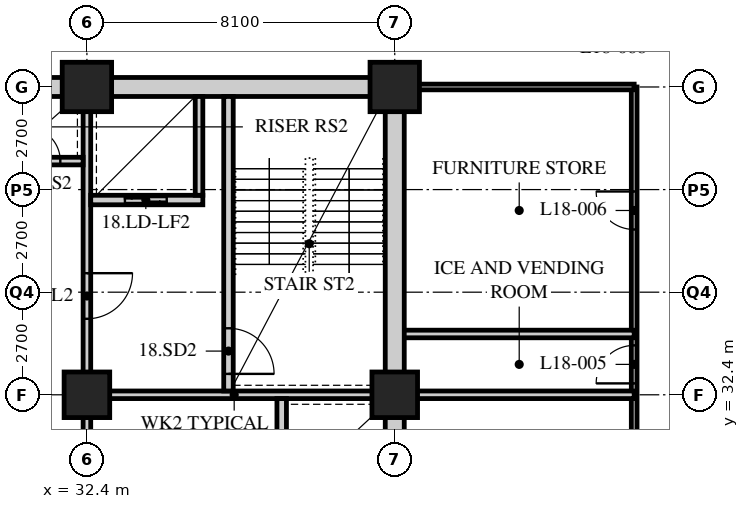
"""IFC4 building model, lengths in metres.
Left out: names, types, materials, properties, quantities, classifications, styles, units other than length and angle.
Written with IfcOpenShell. Run it as: python <this file> out.ifc"""

import sys

from ifc_helpers import new_model, si_unit, direction, frame, frame_2d, origin, origin_2d, place, context, subcontext, project, spatial, rectangle, hollow_rectangle, extrude, element, fill, save


model = new_model("IFC4")
c1 = context("Model", 3, precision=1e-05, world=origin(), true_north=direction((0.0, 1.0)))
c2 = subcontext(c1, "Body", "Model", "MODEL_VIEW")
j1 = project(units=[si_unit("LENGTHUNIT", "METRE"), si_unit("PLANEANGLEUNIT", "RADIAN")], contexts=[c1])
p1 = place(None, origin())
s1 = spatial("IfcSite", under=j1, at=p1, CompositionType="ELEMENT")
p2 = place(p1, origin())
s2 = spatial("IfcBuilding", under=s1, at=p2, CompositionType="ELEMENT")
p3 = place(p2, frame((0.0, 0.0, 73.8)))
s3 = spatial("IfcBuildingStorey", under=s2, at=p3, CompositionType="ELEMENT", Elevation=73.8)
p4 = place(p3, frame((32.4, 32.4, 0.0), z_axis=(0.0, 0.0, 1.0), x_axis=(1.0, 0.0, 0.0)))
e1 = element("IfcColumn", 1, at=p4, inside=s3, PredefinedType="COLUMN", context=c2, shape_type="SweptSolid", body=[
    extrude(hollow_rectangle(XDim=1.2, YDim=1.2, WallThickness=0.12, at=origin_2d()), origin(), (0.0, 0.0, 1.0), 3.4),
])
p5 = place(p3, frame((32.4, 40.5, 0.0), z_axis=(0.0, 0.0, 1.0), x_axis=(1.0, 0.0, 0.0)))
e2 = element("IfcColumn", 2, at=p5, inside=s3, PredefinedType="COLUMN", context=c2, shape_type="SweptSolid", body=[
    extrude(hollow_rectangle(XDim=1.3, YDim=1.3, WallThickness=0.13, at=origin_2d()), origin(), (0.0, 0.0, 1.0), 3.4),
])
p6 = place(p3, frame((40.5, 32.4, 0.0), z_axis=(0.0, 0.0, 1.0), x_axis=(1.0, 0.0, 0.0)))
e3 = element("IfcColumn", 3, at=p6, inside=s3, PredefinedType="COLUMN", context=c2, shape_type="SweptSolid", body=[
    extrude(hollow_rectangle(XDim=1.2, YDim=1.2, WallThickness=0.12, at=origin_2d()), origin(), (0.0, 0.0, 1.0), 3.4),
])
p7 = place(p3, frame((40.5, 40.5, 0.0), z_axis=(0.0, 0.0, 1.0), x_axis=(1.0, 0.0, 0.0)))
e4 = element("IfcColumn", 4, at=p7, inside=s3, PredefinedType="COLUMN", context=c2, shape_type="SweptSolid", body=[
    extrude(hollow_rectangle(XDim=1.3, YDim=1.3, WallThickness=0.13, at=origin_2d()), origin(), (0.0, 0.0, 1.0), 3.4),
])
p8 = place(p3, frame((46.8, 18.0, 0.0), z_axis=(0.0, 0.0, 1.0), x_axis=(0.0, 1.0, 0.0)))
e5 = element("IfcWall", 5, at=p8, inside=s3, PredefinedType="PARTITIONING", context=c2, shape_type="SweptSolid", body=[
    extrude(rectangle(XDim=22.5, YDim=0.15, at=frame_2d((11.25, 0.0))), origin(), (0.0, 0.0, 1.0), 3.19),
])
p9 = place(p8, frame((7.229, 0.0, 0.0)))
e6 = element("IfcOpeningElement", 6, at=p9, cuts=e5, PredefinedType="OPENING", context=c2, shape_type="SweptSolid", body=[
    extrude(rectangle(XDim=1.0, YDim=2.1, at=frame_2d((0.5, 1.05))), frame((0.0, 0.085, 0.0), z_axis=(0.0, -1.0, 0.0), x_axis=(1.0, 0.0, 0.0)), (0.0, 0.0, 1.0), 0.17),
])
p10 = place(p8, frame((11.279, 0.0, 0.0)))
e7 = element("IfcOpeningElement", 7, at=p10, cuts=e5, PredefinedType="OPENING", context=c2, shape_type="SweptSolid", body=[
    extrude(rectangle(XDim=1.0, YDim=2.1, at=frame_2d((0.5, 1.05))), frame((0.0, 0.085, 0.0), z_axis=(0.0, -1.0, 0.0), x_axis=(1.0, 0.0, 0.0)), (0.0, 0.0, 1.0), 0.17),
])
p11 = place(p8, frame((14.7, 0.0, 0.0)))
e8 = element("IfcOpeningElement", 8, at=p11, cuts=e5, PredefinedType="OPENING", context=c2, shape_type="SweptSolid", body=[
    extrude(rectangle(XDim=1.0, YDim=2.1, at=frame_2d((0.5, 1.05))), frame((0.0, 0.085, 0.0), z_axis=(0.0, -1.0, 0.0), x_axis=(1.0, 0.0, 0.0)), (0.0, 0.0, 1.0), 0.17),
])
p12 = place(p8, frame((18.75, 0.0, 0.0)))
e9 = element("IfcOpeningElement", 9, at=p12, cuts=e5, PredefinedType="OPENING", context=c2, shape_type="SweptSolid", body=[
    extrude(rectangle(XDim=1.0, YDim=2.1, at=frame_2d((0.5, 1.05))), frame((0.0, 0.085, 0.0), z_axis=(0.0, -1.0, 0.0), x_axis=(1.0, 0.0, 0.0)), (0.0, 0.0, 1.0), 0.17),
])
p13 = place(p3, frame((46.8, 40.5, 0.0), z_axis=(0.0, 0.0, 1.0), x_axis=(-1.0, 0.0, 0.0)))
e10 = element("IfcWall", 10, at=p13, inside=s3, PredefinedType="PARTITIONING", context=c2, shape_type="SweptSolid", body=[
    extrude(rectangle(XDim=6.1, YDim=0.15, at=frame_2d((3.05, 0.0))), origin(), (0.0, 0.0, 1.0), 2.578),
])
p14 = place(p3, frame((40.5, 32.4, 0.0), z_axis=(0.0, 0.0, 1.0), x_axis=(1.0, 0.0, 0.0)))
e11 = element("IfcWall", 11, at=p14, inside=s3, PredefinedType="SOLIDWALL", context=c2, shape_type="SweptSolid", body=[
    extrude(rectangle(XDim=6.3, YDim=0.2, at=frame_2d((3.15, 0.0))), origin(), (0.0, 0.0, 1.0), 2.578),
])
p15 = place(p3, frame((46.8, 34.0, 0.0), z_axis=(0.0, 0.0, 1.0), x_axis=(-1.0, 0.0, 0.0)))
e12 = element("IfcWall", 12, at=p15, inside=s3, PredefinedType="SOLIDWALL", context=c2, shape_type="SweptSolid", body=[
    extrude(rectangle(XDim=6.3, YDim=0.2, at=frame_2d((3.15, 0.0))), origin(), (0.0, 0.0, 1.0), 3.19),
])
p16 = place(p3, frame((15.95, 40.5, 0.0), z_axis=(0.0, 0.0, 1.0), x_axis=(1.0, 0.0, 0.0)))
e13 = element("IfcWall", 13, at=p16, inside=s3, PredefinedType="SOLIDWALL", context=c2, shape_type="SweptSolid", body=[
    extrude(rectangle(XDim=24.8, YDim=0.5, at=frame_2d((12.4, 0.0))), origin(), (0.0, 0.0, 1.0), 2.54),
])
p17 = place(p16, frame((11.5, 0.0, 0.0)))
e14 = element("IfcOpeningElement", 14, at=p17, cuts=e13, PredefinedType="OPENING", context=c2, shape_type="SweptSolid", body=[
    extrude(rectangle(XDim=1.8, YDim=2.4, at=frame_2d((0.9, 1.2))), frame((0.0, 0.26, 0.0), z_axis=(0.0, -1.0, 0.0), x_axis=(1.0, 0.0, 0.0)), (0.0, 0.0, 1.0), 0.52),
])
p18 = place(p3, frame((40.5, 24.55, 0.0), z_axis=(0.0, 0.0, 1.0), x_axis=(0.0, 1.0, 0.0)))
e15 = element("IfcWall", 15, at=p18, inside=s3, PredefinedType="SOLIDWALL", context=c2, shape_type="SweptSolid", body=[
    extrude(rectangle(XDim=15.7, YDim=0.5, at=frame_2d((7.85, 0.0))), origin(), (0.0, 0.0, 1.0), 2.578),
])
p19 = place(p3, frame((32.3, 32.4, 0.0), z_axis=(0.0, 0.0, 1.0), x_axis=(1.0, 0.0, 0.0)))
e16 = element("IfcWall", 16, at=p19, inside=s3, PredefinedType="SOLIDWALL", context=c2, shape_type="SweptSolid", body=[
    extrude(rectangle(XDim=7.95, YDim=0.2, at=frame_2d((3.975, 0.0))), origin(), (0.0, 0.0, 1.0), 2.578),
])
p20 = place(p3, frame((32.4, 32.5, 0.0), z_axis=(0.0, 0.0, 1.0), x_axis=(0.0, 1.0, 0.0)))
e17 = element("IfcWall", 17, at=p20, inside=s3, PredefinedType="SOLIDWALL", context=c2, shape_type="SweptSolid", body=[
    extrude(rectangle(XDim=7.75, YDim=0.2, at=frame_2d((3.875, 0.0))), origin(), (0.0, 0.0, 1.0), 2.578),
])
p21 = place(p20, frame((1.9, 0.0, 0.0)))
e18 = element("IfcOpeningElement", 18, at=p21, cuts=e17, PredefinedType="OPENING", context=c2, shape_type="SweptSolid", body=[
    extrude(rectangle(XDim=1.2, YDim=2.1, at=frame_2d((0.6, 1.05))), frame((0.0, 0.11, 0.0), z_axis=(0.0, -1.0, 0.0), x_axis=(1.0, 0.0, 0.0)), (0.0, 0.0, 1.0), 0.22),
])
p22 = place(p3, frame((37.525, 24.55, 0.0), z_axis=(0.0, 0.0, 1.0), x_axis=(0.0, 1.0, 0.0)))
e19 = element("IfcWall", 19, at=p22, inside=s3, PredefinedType="SOLIDWALL", context=c2, shape_type="SweptSolid", body=[
    extrude(rectangle(XDim=7.75, YDim=0.25, at=frame_2d((3.875, 0.0))), origin(), (0.0, 0.0, 1.0), 3.19),
])
p23 = place(p3, frame((36.125, 32.5, 0.0), z_axis=(0.0, 0.0, 1.0), x_axis=(0.0, 1.0, 0.0)))
e20 = element("IfcWall", 20, at=p23, inside=s3, PredefinedType="SOLIDWALL", context=c2, shape_type="SweptSolid", body=[
    extrude(rectangle(XDim=7.75, YDim=0.25, at=frame_2d((3.875, 0.0))), origin(), (0.0, 0.0, 1.0), 3.19),
])
p24 = place(p23, frame((0.45, 0.0, 0.0)))
e21 = element("IfcOpeningElement", 21, at=p24, cuts=e20, PredefinedType="OPENING", context=c2, shape_type="SweptSolid", body=[
    extrude(rectangle(XDim=1.2, YDim=2.1, at=frame_2d((0.6, 1.05))), frame((0.0, 0.135, 0.0), z_axis=(0.0, -1.0, 0.0), x_axis=(1.0, 0.0, 0.0)), (0.0, 0.0, 1.0), 0.27),
])
p25 = place(p3, frame((32.5, 37.525, 0.0), z_axis=(0.0, 0.0, 1.0), x_axis=(1.0, 0.0, 0.0)))
e22 = element("IfcWall", 22, at=p25, inside=s3, PredefinedType="SOLIDWALL", context=c2, shape_type="SweptSolid", body=[
    extrude(rectangle(XDim=2.95, YDim=0.25, at=frame_2d((1.475, 0.0))), origin(), (0.0, 0.0, 1.0), 3.19),
])
p26 = place(p25, frame((0.9, 0.0, 0.0)))
e23 = element("IfcOpeningElement", 23, at=p26, cuts=e22, PredefinedType="OPENING", context=c2, shape_type="SweptSolid", body=[
    extrude(rectangle(XDim=1.1, YDim=2.4, at=frame_2d((0.55, 1.2))), frame((0.0, 0.135, 0.0), z_axis=(0.0, -1.0, 0.0), x_axis=(1.0, 0.0, 0.0)), (0.0, 0.0, 1.0), 0.27),
])
p27 = place(p3, frame((35.35, 37.65, 0.0), z_axis=(0.0, 0.0, 1.0), x_axis=(0.0, 1.0, 0.0)))
e24 = element("IfcWall", 24, at=p27, inside=s3, PredefinedType="SOLIDWALL", context=c2, shape_type="SweptSolid", body=[
    extrude(rectangle(XDim=2.6, YDim=0.2, at=frame_2d((1.3, 0.0))), origin(), (0.0, 0.0, 1.0), 3.19),
])
p28 = place(p3, frame((30.15, 38.55, 0.0), z_axis=(0.0, 0.0, 1.0), x_axis=(1.0, 0.0, 0.0)))
e25 = element("IfcWall", 25, at=p28, inside=s3, PredefinedType="SOLIDWALL", context=c2, shape_type="SweptSolid", body=[
    extrude(rectangle(XDim=2.15, YDim=0.2, at=frame_2d((1.075, 0.0))), origin(), (0.0, 0.0, 1.0), 3.19),
])
p29 = place(p28, frame((0.65, 0.0, 0.0)))
e26 = element("IfcOpeningElement", 26, at=p29, cuts=e25, PredefinedType="OPENING", context=c2, shape_type="SweptSolid", body=[
    extrude(rectangle(XDim=0.9, YDim=2.1, at=frame_2d((0.45, 1.05))), frame((0.0, 0.11, 0.0), z_axis=(0.0, -1.0, 0.0), x_axis=(1.0, 0.0, 0.0)), (0.0, 0.0, 1.0), 0.22),
])
p30 = place(p3, frame((32.4, 24.55, 0.0), z_axis=(0.0, 0.0, 1.0), x_axis=(0.0, 1.0, 0.0)))
e27 = element("IfcWall", 27, at=p30, inside=s3, PredefinedType="PARTITIONING", context=c2, shape_type="SweptSolid", body=[
    extrude(rectangle(XDim=7.75, YDim=0.2, at=frame_2d((3.875, 0.0))), origin(), (0.0, 0.0, 1.0), 2.578),
])
p31 = place(p30, frame((1.4, 0.0, 0.0)))
e28 = element("IfcOpeningElement", 28, at=p31, cuts=e27, PredefinedType="OPENING", context=c2, shape_type="SweptSolid", body=[
    extrude(rectangle(XDim=0.9, YDim=2.1, at=frame_2d((0.45, 1.05))), frame((0.0, 0.11, 0.0), z_axis=(0.0, -1.0, 0.0), x_axis=(1.0, 0.0, 0.0)), (0.0, 0.0, 1.0), 0.22),
])
p32 = place(p30, frame((5.35, 0.0, 0.0)))
e29 = element("IfcOpeningElement", 29, at=p32, cuts=e27, PredefinedType="OPENING", context=c2, shape_type="SweptSolid", body=[
    extrude(rectangle(XDim=0.9, YDim=2.1, at=frame_2d((0.45, 1.05))), frame((0.0, 0.11, 0.0), z_axis=(0.0, -1.0, 0.0), x_axis=(1.0, 0.0, 0.0)), (0.0, 0.0, 1.0), 0.22),
])
p33 = place(p11, origin())
e30 = element("IfcDoor", 30, at=p33, inside=s3, OperationType="SINGLE_SWING_LEFT", PredefinedType="DOOR", context=c2, shape_type="SweptSolid", body=[
    extrude(rectangle(XDim=1.0, YDim=2.1, at=frame_2d((0.5, 1.05))), frame((0.0, 0.025, 0.0), z_axis=(0.0, -1.0, 0.0), x_axis=(1.0, 0.0, 0.0)), (0.0, 0.0, 1.0), 0.05),
])
fill(e8, e30)
p34 = place(p12, origin())
e31 = element("IfcDoor", 31, at=p34, inside=s3, OperationType="SINGLE_SWING_RIGHT", PredefinedType="DOOR", context=c2, shape_type="SweptSolid", body=[
    extrude(rectangle(XDim=1.0, YDim=2.1, at=frame_2d((0.5, 1.05))), frame((0.0, 0.025, 0.0), z_axis=(0.0, -1.0, 0.0), x_axis=(1.0, 0.0, 0.0)), (0.0, 0.0, 1.0), 0.05),
])
fill(e9, e31)
p35 = place(p24, origin())
e32 = element("IfcDoor", 32, at=p35, inside=s3, OperationType="SINGLE_SWING_RIGHT", PredefinedType="DOOR", context=c2, shape_type="SweptSolid", body=[
    extrude(rectangle(XDim=1.2, YDim=2.1, at=frame_2d((0.6, 1.05))), frame((0.0, 0.025, 0.0), z_axis=(0.0, -1.0, 0.0), x_axis=(1.0, 0.0, 0.0)), (0.0, 0.0, 1.0), 0.05),
])
fill(e21, e32)
p36 = place(p21, origin())
e33 = element("IfcDoor", 33, at=p36, inside=s3, OperationType="SINGLE_SWING_LEFT", PredefinedType="DOOR", context=c2, shape_type="SweptSolid", body=[
    extrude(rectangle(XDim=1.2, YDim=2.1, at=frame_2d((0.6, 1.05))), frame((0.0, 0.025, 0.0), z_axis=(0.0, -1.0, 0.0), x_axis=(1.0, 0.0, 0.0)), (0.0, 0.0, 1.0), 0.05),
])
fill(e18, e33)
p37 = place(p29, origin())
e34 = element("IfcDoor", 34, at=p37, inside=s3, OperationType="SINGLE_SWING_LEFT", PredefinedType="DOOR", context=c2, shape_type="SweptSolid", body=[
    extrude(rectangle(XDim=0.9, YDim=2.1, at=frame_2d((0.45, 1.05))), frame((0.0, 0.025, 0.0), z_axis=(0.0, -1.0, 0.0), x_axis=(1.0, 0.0, 0.0)), (0.0, 0.0, 1.0), 0.05),
])
fill(e26, e34)
p38 = place(p26, origin())
e35 = element("IfcDoor", 35, at=p38, inside=s3, OperationType="DOUBLE_DOOR_SLIDING", PredefinedType="DOOR", context=c2, shape_type="SweptSolid", body=[
    extrude(rectangle(XDim=1.1, YDim=2.4, at=frame_2d((0.55, 1.2))), frame((0.0, 0.025, 0.0), z_axis=(0.0, -1.0, 0.0), x_axis=(1.0, 0.0, 0.0)), (0.0, 0.0, 1.0), 0.05),
])
fill(e23, e35)
save(model, sys.argv[1])
